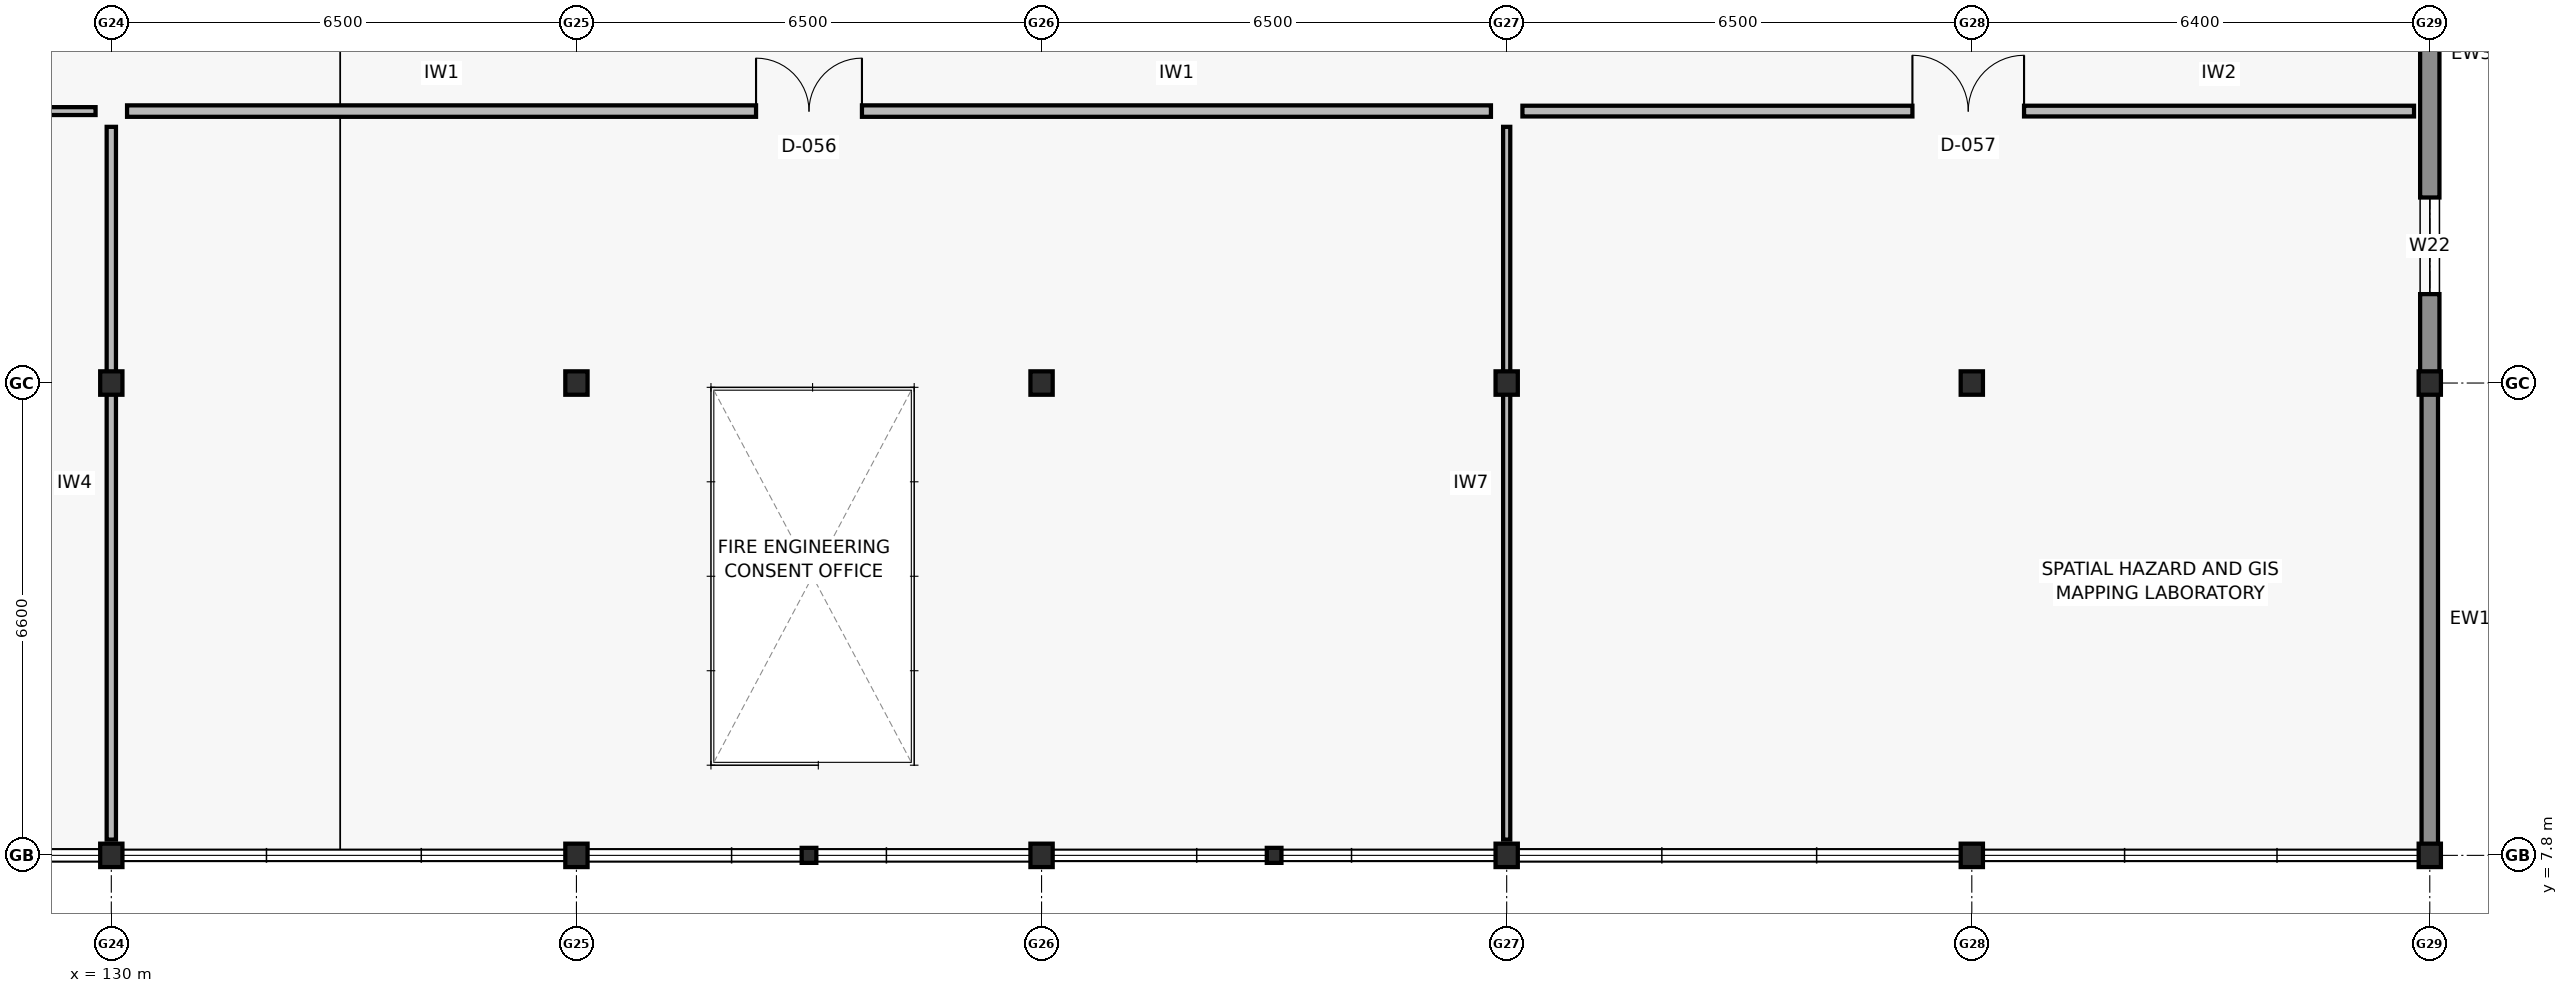
"""IFC4 building model, lengths in metres.
Left out: names, types, materials, properties, quantities, classifications, styles, units other than length and angle.
Written with IfcOpenShell. Run it as: python <this file> out.ifc"""

import sys

from ifc_helpers import new_model, si_unit, direction, frame, frame_2d, origin, origin_2d, place, context, subcontext, project, spatial, rectangle, i_section, extrude, element, fill, save


model = new_model("IFC4")
c1 = context("Model", 3, precision=1e-05, world=origin(), true_north=direction((0.0, 1.0)))
c2 = subcontext(c1, "Body", "Model", "MODEL_VIEW")
j1 = project(units=[si_unit("LENGTHUNIT", "METRE"), si_unit("PLANEANGLEUNIT", "RADIAN")], contexts=[c1])
p1 = place(None, origin())
s1 = spatial("IfcSite", under=j1, at=p1, CompositionType="ELEMENT")
p2 = place(p1, origin())
s2 = spatial("IfcBuilding", under=s1, at=p2, CompositionType="ELEMENT")
p3 = place(p2, frame((0.0, 0.0, 5.4)))
s3 = spatial("IfcBuildingStorey", under=s2, at=p3, CompositionType="ELEMENT", Elevation=5.4)
for number, where, z_axis, x_axis in (
    (1, (130.0, 7.8, 0.0), (0.0, 0.0, 1.0), (1.0, 0.0, 0.0)),
    (2, (130.0, 14.4, 0.0), (0.0, 0.0, 1.0), (1.0, 0.0, 0.0)),
    (3, (136.5, 7.8, 0.0), (0.0, 0.0, 1.0), (1.0, 0.0, 0.0)),
    (4, (136.5, 14.4, 0.0), (0.0, 0.0, 1.0), (1.0, 0.0, 0.0)),
    (5, (143.0, 7.8, 0.0), (0.0, 0.0, 1.0), (1.0, 0.0, 0.0)),
    (6, (143.0, 14.4, 0.0), (0.0, 0.0, 1.0), (1.0, 0.0, 0.0)),
    (7, (149.5, 7.8, 0.0), (0.0, 0.0, 1.0), (1.0, 0.0, 0.0)),
    (8, (149.5, 14.4, 0.0), (0.0, 0.0, 1.0), (1.0, 0.0, 0.0)),
    (9, (156.0, 7.8, 0.0), (0.0, 0.0, 1.0), (1.0, 0.0, 0.0)),
    (10, (156.0, 14.4, 0.0), (0.0, 0.0, 1.0), (1.0, 0.0, 0.0)),
    (11, (162.4, 7.8, 0.0), (0.0, 0.0, 1.0), (1.0, 0.0, 0.0)),
    (12, (162.4, 14.4, 0.0), (0.0, 0.0, 1.0), (1.0, 0.0, 0.0)),
):
    element("IfcColumn", number, at=place(p3, frame(where, z_axis=z_axis, x_axis=x_axis)), inside=s3, PredefinedType="COLUMN", context=c2, shape_type="SweptSolid", body=[
        extrude(i_section(OverallWidth=0.311, OverallDepth=0.327, WebThickness=0.016, FlangeThickness=0.025, FilletRadius=0.017, at=origin_2d()), origin(), (0.0, 0.0, 1.0), 4.2),
    ])
for number, where, z_axis, x_axis in (
    (13, (139.75, 7.8, 0.0), (0.0, 0.0, 1.0), (1.0, 0.0, 0.0)),
    (14, (146.25, 7.8, 0.0), (0.0, 0.0, 1.0), (1.0, 0.0, 0.0)),
):
    element("IfcColumn", number, at=place(p3, frame(where, z_axis=z_axis, x_axis=x_axis)), inside=s3, PredefinedType="PILASTER", context=c2, shape_type="SweptSolid", body=[
        extrude(i_section(OverallWidth=0.205, OverallDepth=0.21, WebThickness=0.009, FlangeThickness=0.014, FilletRadius=0.011, at=origin_2d()), origin(), (0.0, 0.0, 1.0), 4.2),
    ])
p4 = place(p3, frame((162.4, 14.395, 0.0), z_axis=(0.0, 0.0, 1.0), x_axis=(0.0, -1.0, 0.0)))
e15 = element("IfcWall", 15, at=p4, inside=s3, PredefinedType="SOLIDWALL", context=c2, shape_type="SweptSolid", body=[
    extrude(rectangle(XDim=6.59, YDim=0.23, at=frame_2d((3.295, 0.0))), origin(), (0.0, 0.0, 1.0), 3.32),
])
p5 = place(p3, frame((162.4, 20.995, 0.0), z_axis=(0.0, 0.0, 1.0), x_axis=(0.0, -1.0, 0.0)))
e16 = element("IfcWall", 16, at=p5, inside=s3, PredefinedType="SOLIDWALL", context=c2, shape_type="SweptSolid", body=[
    extrude(rectangle(XDim=6.59, YDim=0.27, at=frame_2d((3.295, 0.0))), origin(), (0.0, 0.0, 1.0), 3.32),
])
p6 = place(p5, frame((4.002, 0.0, 0.8)))
e17 = element("IfcOpeningElement", 17, at=p6, cuts=e16, PredefinedType="OPENING", context=c2, shape_type="SweptSolid", body=[
    extrude(rectangle(XDim=1.35, YDim=2.05, at=frame_2d((0.675, 1.025))), frame((0.0, 0.145, 0.0), z_axis=(0.0, -1.0, 0.0), x_axis=(1.0, 0.0, 0.0)), (0.0, 0.0, 1.0), 0.29),
])
p7 = place(p3, frame((130.0, 8.02, 0.0), z_axis=(0.0, 0.0, 1.0), x_axis=(0.0, 1.0, 0.0)))
e18 = element("IfcWall", 18, at=p7, inside=s3, PredefinedType="PARTITIONING", context=c2, shape_type="SweptSolid", body=[
    extrude(rectangle(XDim=9.96, YDim=0.13, at=frame_2d((4.98, 0.0))), origin(), (0.0, 0.0, 1.0), 3.3),
])
p8 = place(p3, frame((110.72, 18.2, 0.0), z_axis=(0.0, 0.0, 1.0), x_axis=(1.0, 0.0, 0.0)))
e19 = element("IfcWall", 19, at=p8, inside=s3, PredefinedType="PARTITIONING", context=c2, shape_type="SweptSolid", body=[
    extrude(rectangle(XDim=19.06, YDim=0.11, at=frame_2d((9.53, 0.0))), origin(), (0.0, 0.0, 1.0), 3.3),
])
p9 = place(p8, frame((8.82, 0.0, 0.0)))
e20 = element("IfcOpeningElement", 20, at=p9, cuts=e19, PredefinedType="OPENING", context=c2, shape_type="SweptSolid", body=[
    extrude(rectangle(XDim=1.42, YDim=2.15, at=frame_2d((0.71, 1.075))), frame((0.0, 0.065, 0.0), z_axis=(0.0, -1.0, 0.0), x_axis=(1.0, 0.0, 0.0)), (0.0, 0.0, 1.0), 0.13),
])
p10 = place(p3, frame((149.5, 8.02, 0.0), z_axis=(0.0, 0.0, 1.0), x_axis=(0.0, 1.0, 0.0)))
e21 = element("IfcWall", 21, at=p10, inside=s3, PredefinedType="PARTITIONING", context=c2, shape_type="SweptSolid", body=[
    extrude(rectangle(XDim=9.96, YDim=0.1, at=frame_2d((4.98, 0.0))), origin(), (0.0, 0.0, 1.0), 3.3),
])
p11 = place(p3, frame((130.22, 18.2, 0.0), z_axis=(0.0, 0.0, 1.0), x_axis=(1.0, 0.0, 0.0)))
e22 = element("IfcWall", 22, at=p11, inside=s3, PredefinedType="PARTITIONING", context=c2, shape_type="SweptSolid", body=[
    extrude(rectangle(XDim=19.06, YDim=0.16, at=frame_2d((9.53, 0.0))), origin(), (0.0, 0.0, 1.0), 3.3),
])
p12 = place(p11, frame((8.79, 0.0, 0.0)))
e23 = element("IfcOpeningElement", 23, at=p12, cuts=e22, PredefinedType="OPENING", context=c2, shape_type="SweptSolid", body=[
    extrude(rectangle(XDim=1.48, YDim=2.18, at=frame_2d((0.74, 1.09))), frame((0.0, 0.09, 0.0), z_axis=(0.0, -1.0, 0.0), x_axis=(1.0, 0.0, 0.0)), (0.0, 0.0, 1.0), 0.18),
])
p13 = place(p3, frame((149.72, 18.2, 0.0), z_axis=(0.0, 0.0, 1.0), x_axis=(1.0, 0.0, 0.0)))
e24 = element("IfcWall", 24, at=p13, inside=s3, PredefinedType="PARTITIONING", context=c2, shape_type="SweptSolid", body=[
    extrude(rectangle(XDim=12.46, YDim=0.15, at=frame_2d((6.23, 0.0))), origin(), (0.0, 0.0, 1.0), 3.3),
])
p14 = place(p13, frame((5.45, 0.0, 0.0)))
e25 = element("IfcOpeningElement", 25, at=p14, cuts=e24, PredefinedType="OPENING", context=c2, shape_type="SweptSolid", body=[
    extrude(rectangle(XDim=1.56, YDim=2.18, at=frame_2d((0.78, 1.09))), frame((0.0, 0.085, 0.0), z_axis=(0.0, -1.0, 0.0), x_axis=(1.0, 0.0, 0.0)), (0.0, 0.0, 1.0), 0.17),
])
p15 = place(p6, origin())
e26 = element("IfcWindow", 26, at=p15, inside=s3, PartitioningType="SINGLE_PANEL", PredefinedType="WINDOW", context=c2, shape_type="SweptSolid", body=[
    extrude(rectangle(XDim=1.35, YDim=2.05, at=frame_2d((0.675, 1.025))), frame((0.0, 0.03, 0.0), z_axis=(0.0, -1.0, 0.0), x_axis=(1.0, 0.0, 0.0)), (0.0, 0.0, 1.0), 0.06),
])
fill(e17, e26)
p16 = place(p12, origin())
e27 = element("IfcDoor", 27, at=p16, inside=s3, OperationType="DOUBLE_DOOR_SINGLE_SWING", PredefinedType="DOOR", context=c2, shape_type="SweptSolid", body=[
    extrude(rectangle(XDim=1.48, YDim=2.18, at=frame_2d((0.74, 1.09))), frame((0.0, 0.025, 0.0), z_axis=(0.0, -1.0, 0.0), x_axis=(1.0, 0.0, 0.0)), (0.0, 0.0, 1.0), 0.05),
])
fill(e23, e27)
p17 = place(p14, origin())
e28 = element("IfcDoor", 28, at=p17, inside=s3, OperationType="DOUBLE_DOOR_SINGLE_SWING", PredefinedType="DOOR", context=c2, shape_type="SweptSolid", body=[
    extrude(rectangle(XDim=1.56, YDim=2.18, at=frame_2d((0.78, 1.09))), frame((0.0, 0.025, 0.0), z_axis=(0.0, -1.0, 0.0), x_axis=(1.0, 0.0, 0.0)), (0.0, 0.0, 1.0), 0.05),
])
fill(e25, e28)
save(model, sys.argv[1])
